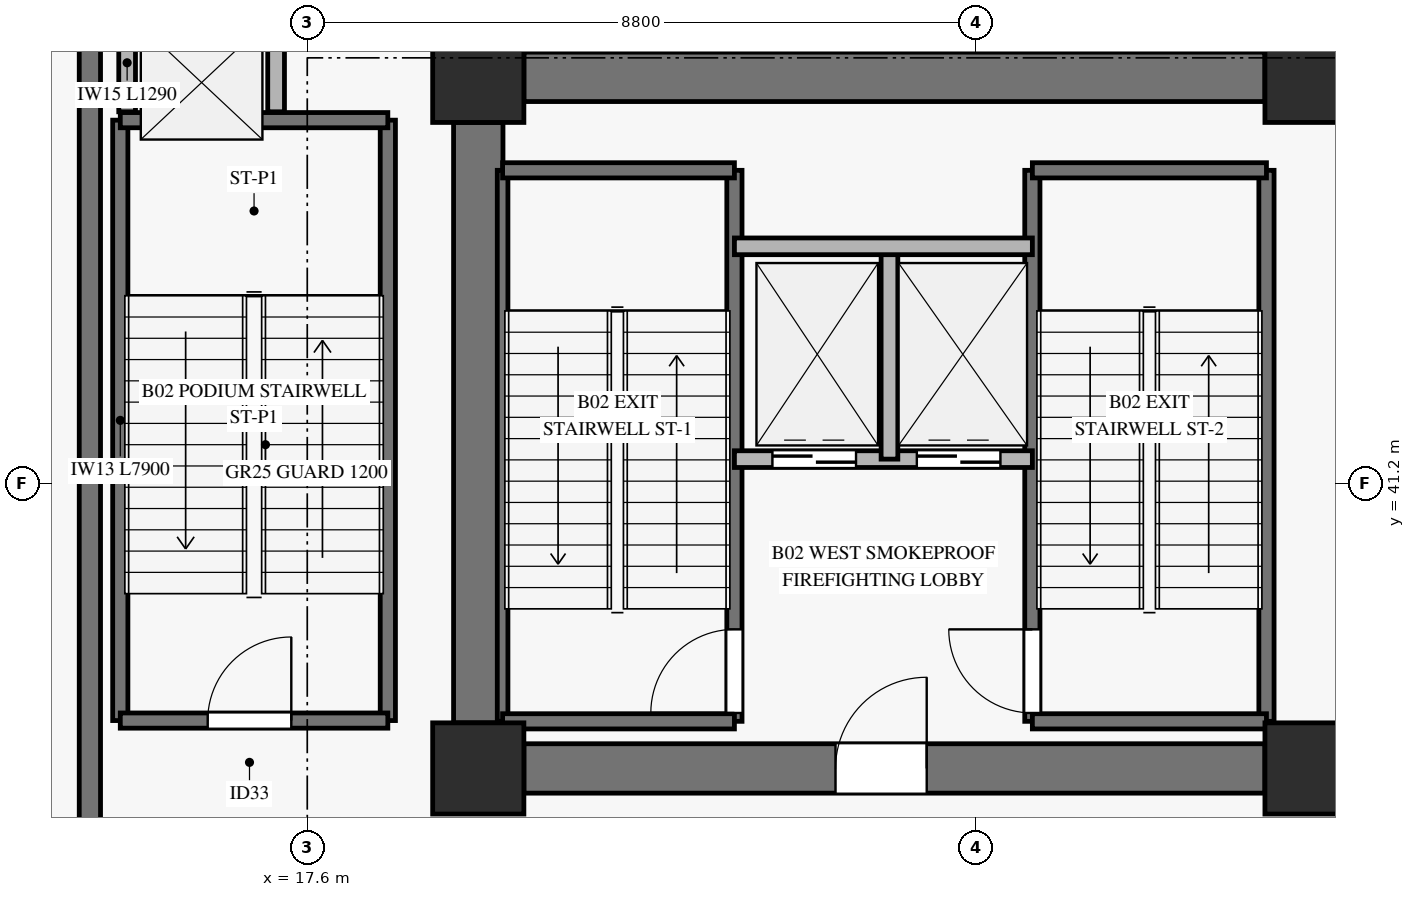
"""IFC4 building model, lengths in metres.
Left out: names, types, materials, properties, quantities, classifications, styles, units other than length and angle.
Written with IfcOpenShell. Run it as: python <this file> out.ifc"""

import sys

from ifc_helpers import new_model, si_unit, direction, frame, frame_2d, origin, origin_2d, place, context, subcontext, project, spatial, rectangle, extrude, source, transform, mapped, element, fill, save


model = new_model("IFC4")
c1 = context("Model", 3, precision=1e-05, world=origin(), true_north=direction((0.0, 1.0)))
c2 = subcontext(c1, "Body", "Model", "MODEL_VIEW")
j1 = project(units=[si_unit("LENGTHUNIT", "METRE"), si_unit("PLANEANGLEUNIT", "RADIAN")], contexts=[c1])
p1 = place(None, origin())
s1 = spatial("IfcSite", under=j1, at=p1, CompositionType="ELEMENT")
p2 = place(p1, origin())
s2 = spatial("IfcBuilding", under=s1, at=p2, CompositionType="ELEMENT")
p3 = place(p2, frame((0.0, 0.0, -10.4)))
s3 = spatial("IfcBuildingStorey", under=s2, at=p3, CompositionType="ELEMENT", Elevation=-10.4)
m1 = source(origin(), c2, "Body", "SweptSolid", [
    extrude(rectangle(XDim=1.2, YDim=1.2, at=origin_2d()), origin(), (0.0, 0.0, 1.0), 4.9),
])
for number, where, z_axis, x_axis in (
    (1, (19.85, 37.45, 0.0), (0.0, 0.0, 1.0), (1.0, 0.0, 0.0)),
    (2, (19.85, 46.55, 0.0), (0.0, 0.0, 1.0), (1.0, 0.0, 0.0)),
    (3, (30.8, 37.45, 0.0), (0.0, 0.0, 1.0), (1.0, 0.0, 0.0)),
    (4, (30.8, 46.55, 0.0), (0.0, 0.0, 1.0), (1.0, 0.0, 0.0)),
):
    element("IfcColumn", number, at=place(p3, frame(where, z_axis=z_axis, x_axis=x_axis)), inside=s3, PredefinedType="PILASTER", context=c2, shape_type="MappedRepresentation", body=[
        mapped(m1, transform((0.0, 0.0, 0.0), x_axis=(1.0, 0.0, 0.0), y_axis=(0.0, 1.0, 0.0), z_axis=(0.0, 0.0, 1.0), scale=1.0)),
    ])
p4 = place(p3, frame((20.45, 46.55, 0.0), z_axis=(0.0, 0.0, 1.0), x_axis=(1.0, 0.0, 0.0)))
e5 = element("IfcWall", 5, at=p4, inside=s3, PredefinedType="SHEAR", context=c2, shape_type="SweptSolid", body=[
    extrude(rectangle(XDim=9.75, YDim=0.65, at=frame_2d((4.875, 0.0))), origin(), (0.0, 0.0, 1.0), 4.9),
])
p5 = place(p3, frame((20.45, 37.45, 0.0), z_axis=(0.0, 0.0, 1.0), x_axis=(1.0, 0.0, 0.0)))
e6 = element("IfcWall", 6, at=p5, inside=s3, PredefinedType="SHEAR", context=c2, shape_type="SweptSolid", body=[
    extrude(rectangle(XDim=9.75, YDim=0.65, at=frame_2d((4.875, 0.0))), origin(), (0.0, 0.0, 1.0), 4.9),
])
p6 = place(p5, frame((4.1, 0.0, 0.0)))
e7 = element("IfcOpeningElement", 7, at=p6, cuts=e6, PredefinedType="OPENING", context=c2, shape_type="SweptSolid", body=[
    extrude(rectangle(XDim=1.2, YDim=2.15, at=frame_2d((0.6, 1.075))), frame((0.0, 0.335, 0.0), z_axis=(0.0, -1.0, 0.0), x_axis=(1.0, 0.0, 0.0)), (0.0, 0.0, 1.0), 0.67),
])
p7 = place(p3, frame((19.85, 38.05, 0.0), z_axis=(0.0, 0.0, 1.0), x_axis=(0.0, 1.0, 0.0)))
e8 = element("IfcWall", 8, at=p7, inside=s3, PredefinedType="SHEAR", context=c2, shape_type="SweptSolid", body=[
    extrude(rectangle(XDim=7.9, YDim=0.65, at=frame_2d((3.95, 0.0))), origin(), (0.0, 0.0, 1.0), 4.9),
])
p8 = place(p3, frame((14.74, 6.76, 0.0), z_axis=(0.0, 0.0, 1.0), x_axis=(0.0, 1.0, 0.0)))
e9 = element("IfcWall", 9, at=p8, inside=s3, PredefinedType="SOLIDWALL", context=c2, shape_type="SweptSolid", body=[
    extrude(rectangle(XDim=42.0, YDim=0.28, at=frame_2d((21.0, 0.0))), origin(), (0.0, 0.0, 1.0), 5.2),
])
p9 = place(p3, frame((20.17, 38.07, 0.0), z_axis=(0.0, 0.0, 1.0), x_axis=(0.0, 1.0, 0.0)))
e10 = element("IfcWall", 10, at=p9, inside=s3, PredefinedType="SOLIDWALL", context=c2, shape_type="SweptSolid", body=[
    extrude(rectangle(XDim=7.25, YDim=0.14, at=frame_2d((3.625, 0.0))), origin(), (0.0, 0.0, 1.0), 5.2),
])
p10 = place(p3, frame((23.22, 38.07, 0.0), z_axis=(0.0, 0.0, 1.0), x_axis=(0.0, 1.0, 0.0)))
e11 = element("IfcWall", 11, at=p10, inside=s3, PredefinedType="SOLIDWALL", context=c2, shape_type="SweptSolid", body=[
    extrude(rectangle(XDim=7.25, YDim=0.2, at=frame_2d((3.625, 0.0))), origin(), (0.0, 0.0, 1.0), 5.2),
])
p11 = place(p10, frame((0.11, 0.0, 0.0)))
e12 = element("IfcOpeningElement", 12, at=p11, cuts=e11, PredefinedType="OPENING", context=c2, shape_type="SweptSolid", body=[
    extrude(rectangle(XDim=1.1, YDim=2.15, at=frame_2d((0.55, 1.075))), frame((0.0, 0.11, 0.0), z_axis=(0.0, -1.0, 0.0), x_axis=(1.0, 0.0, 0.0)), (0.0, 0.0, 1.0), 0.22),
])
for number, where, z_axis, x_axis in (
    (13, (20.17, 45.32, 0.0), (0.0, 0.0, 1.0), (1.0, 0.0, 0.0)),
    (14, (20.17, 38.07, 0.0), (0.0, 0.0, 1.0), (1.0, 0.0, 0.0)),
):
    element("IfcWall", number, at=place(p3, frame(where, z_axis=z_axis, x_axis=x_axis)), inside=s3, PredefinedType="SOLIDWALL", context=c2, shape_type="SweptSolid", body=[
        extrude(rectangle(XDim=3.05, YDim=0.2, at=frame_2d((1.525, 0.0))), origin(), (0.0, 0.0, 1.0), 5.2),
    ])
p12 = place(p3, frame((27.14, 38.07, 0.0), z_axis=(0.0, 0.0, 1.0), x_axis=(0.0, 1.0, 0.0)))
e15 = element("IfcWall", 15, at=p12, inside=s3, PredefinedType="SOLIDWALL", context=c2, shape_type="SweptSolid", body=[
    extrude(rectangle(XDim=7.25, YDim=0.2, at=frame_2d((3.625, 0.0))), origin(), (0.0, 0.0, 1.0), 5.2),
])
p13 = place(p12, frame((0.11, 0.0, 0.0)))
e16 = element("IfcOpeningElement", 16, at=p13, cuts=e15, PredefinedType="OPENING", context=c2, shape_type="SweptSolid", body=[
    extrude(rectangle(XDim=1.1, YDim=2.15, at=frame_2d((0.55, 1.075))), frame((0.0, 0.11, 0.0), z_axis=(0.0, -1.0, 0.0), x_axis=(1.0, 0.0, 0.0)), (0.0, 0.0, 1.0), 0.22),
])
p14 = place(p3, frame((30.22, 38.07, 0.0), z_axis=(0.0, 0.0, 1.0), x_axis=(0.0, 1.0, 0.0)))
e17 = element("IfcWall", 17, at=p14, inside=s3, PredefinedType="SOLIDWALL", context=c2, shape_type="SweptSolid", body=[
    extrude(rectangle(XDim=7.25, YDim=0.2, at=frame_2d((3.625, 0.0))), origin(), (0.0, 0.0, 1.0), 5.2),
])
for number, where, z_axis, x_axis in (
    (18, (27.14, 45.32, 0.0), (0.0, 0.0, 1.0), (1.0, 0.0, 0.0)),
    (19, (27.14, 38.07, 0.0), (0.0, 0.0, 1.0), (1.0, 0.0, 0.0)),
):
    element("IfcWall", number, at=place(p3, frame(where, z_axis=z_axis, x_axis=x_axis)), inside=s3, PredefinedType="SOLIDWALL", context=c2, shape_type="SweptSolid", body=[
        extrude(rectangle(XDim=3.08, YDim=0.2, at=frame_2d((1.54, 0.0))), origin(), (0.0, 0.0, 1.0), 5.2),
    ])
p15 = place(p3, frame((23.22, 41.52, 0.0), z_axis=(0.0, 0.0, 1.0), x_axis=(1.0, 0.0, 0.0)))
e20 = element("IfcWall", 20, at=p15, inside=s3, PredefinedType="SOLIDWALL", context=c2, shape_type="SweptSolid", body=[
    extrude(rectangle(XDim=3.92, YDim=0.22, at=frame_2d((1.96, 0.0))), origin(), (0.0, 0.0, 1.0), 4.9),
])
p16 = place(p15, frame((0.5, 0.0, 0.0)))
e21 = element("IfcOpeningElement", 21, at=p16, cuts=e20, PredefinedType="OPENING", context=c2, shape_type="SweptSolid", body=[
    extrude(rectangle(XDim=1.1, YDim=2.2, at=frame_2d((0.55, 1.1))), frame((0.0, 0.12, 0.0), z_axis=(0.0, -1.0, 0.0), x_axis=(1.0, 0.0, 0.0)), (0.0, 0.0, 1.0), 0.24),
])
p17 = place(p15, frame((2.4, 0.0, 0.0)))
e22 = element("IfcOpeningElement", 22, at=p17, cuts=e20, PredefinedType="OPENING", context=c2, shape_type="SweptSolid", body=[
    extrude(rectangle(XDim=1.1, YDim=2.2, at=frame_2d((0.55, 1.1))), frame((0.0, 0.12, 0.0), z_axis=(0.0, -1.0, 0.0), x_axis=(1.0, 0.0, 0.0)), (0.0, 0.0, 1.0), 0.24),
])
p18 = place(p3, frame((25.26, 41.52, 0.0), z_axis=(0.0, 0.0, 1.0), x_axis=(0.0, 1.0, 0.0)))
e23 = element("IfcWall", 23, at=p18, inside=s3, PredefinedType="SOLIDWALL", context=c2, shape_type="SweptSolid", body=[
    extrude(rectangle(XDim=2.8, YDim=0.22, at=frame_2d((1.4, 0.0))), origin(), (0.0, 0.0, 1.0), 4.9),
])
p19 = place(p3, frame((23.22, 44.32, 0.0), z_axis=(0.0, 0.0, 1.0), x_axis=(1.0, 0.0, 0.0)))
e24 = element("IfcWall", 24, at=p19, inside=s3, PredefinedType="SOLIDWALL", context=c2, shape_type="SweptSolid", body=[
    extrude(rectangle(XDim=3.92, YDim=0.22, at=frame_2d((1.96, 0.0))), origin(), (0.0, 0.0, 1.0), 4.9),
])
for number, where, z_axis, x_axis in (
    (25, (15.14, 38.08, 0.0), (0.0, 0.0, 1.0), (0.0, 1.0, 0.0)),
    (26, (18.66, 38.08, 0.0), (0.0, 0.0, 1.0), (0.0, 1.0, 0.0)),
):
    element("IfcWall", number, at=place(p3, frame(where, z_axis=z_axis, x_axis=x_axis)), inside=s3, PredefinedType="SOLIDWALL", context=c2, shape_type="SweptSolid", body=[
        extrude(rectangle(XDim=7.9, YDim=0.2, at=frame_2d((3.95, 0.0))), origin(), (0.0, 0.0, 1.0), 5.2),
    ])
p20 = place(p3, frame((15.14, 45.98, 0.0), z_axis=(0.0, 0.0, 1.0), x_axis=(1.0, 0.0, 0.0)))
e27 = element("IfcWall", 27, at=p20, inside=s3, PredefinedType="SOLIDWALL", context=c2, shape_type="SweptSolid", body=[
    extrude(rectangle(XDim=3.52, YDim=0.2, at=frame_2d((1.76, 0.0))), origin(), (0.0, 0.0, 1.0), 5.2),
])
p21 = place(p3, frame((15.14, 38.08, 0.0), z_axis=(0.0, 0.0, 1.0), x_axis=(1.0, 0.0, 0.0)))
e28 = element("IfcWall", 28, at=p21, inside=s3, PredefinedType="SOLIDWALL", context=c2, shape_type="SweptSolid", body=[
    extrude(rectangle(XDim=3.52, YDim=0.2, at=frame_2d((1.76, 0.0))), origin(), (0.0, 0.0, 1.0), 5.2),
])
p22 = place(p21, frame((1.15, 0.0, 0.0)))
e29 = element("IfcOpeningElement", 29, at=p22, cuts=e28, PredefinedType="OPENING", context=c2, shape_type="SweptSolid", body=[
    extrude(rectangle(XDim=1.1, YDim=2.15, at=frame_2d((0.55, 1.075))), frame((0.0, 0.11, 0.0), z_axis=(0.0, -1.0, 0.0), x_axis=(1.0, 0.0, 0.0)), (0.0, 0.0, 1.0), 0.22),
])
for number, where, z_axis, x_axis in (
    (30, (15.23, 46.09, 0.0), (0.0, 0.0, 1.0), (0.0, 1.0, 0.0)),
    (31, (17.19, 46.09, 0.0), (0.0, 0.0, 1.0), (0.0, 1.0, 0.0)),
):
    element("IfcWall", number, at=place(p3, frame(where, z_axis=z_axis, x_axis=x_axis)), inside=s3, PredefinedType="SOLIDWALL", context=c2, shape_type="SweptSolid", body=[
        extrude(rectangle(XDim=1.29, YDim=0.22, at=frame_2d((0.645, 0.0))), origin(), (0.0, 0.0, 1.0), 4.9),
    ])
m2 = source(origin(), c2, "Body", "SweptSolid", [
    extrude(rectangle(XDim=1.1, YDim=2.15, at=frame_2d((0.55, 1.075))), frame((0.0, 0.025, 0.0), z_axis=(0.0, -1.0, 0.0), x_axis=(1.0, 0.0, 0.0)), (0.0, 0.0, 1.0), 0.05),
])
p23 = place(p11, origin())
e32 = element("IfcDoor", 32, at=p23, inside=s3, OperationType="SINGLE_SWING_LEFT", PredefinedType="DOOR", context=c2, shape_type="MappedRepresentation", body=[
    mapped(m2, transform((0.0, 0.0, 0.0), x_axis=(1.0, 0.0, 0.0), y_axis=(0.0, 1.0, 0.0), z_axis=(0.0, 0.0, 1.0), scale=1.0)),
])
fill(e12, e32)
p24 = place(p13, origin())
e33 = element("IfcDoor", 33, at=p24, inside=s3, OperationType="SINGLE_SWING_RIGHT", PredefinedType="DOOR", context=c2, shape_type="MappedRepresentation", body=[
    mapped(m2, transform((0.0, 0.0, 0.0), x_axis=(1.0, 0.0, 0.0), y_axis=(0.0, 1.0, 0.0), z_axis=(0.0, 0.0, 1.0), scale=1.0)),
])
fill(e16, e33)
m3 = source(origin(), c2, "Body", "SweptSolid", [
    extrude(rectangle(XDim=1.1, YDim=2.2, at=frame_2d((0.55, 1.1))), frame((0.0, 0.025, 0.0), z_axis=(0.0, -1.0, 0.0), x_axis=(1.0, 0.0, 0.0)), (0.0, 0.0, 1.0), 0.05),
])
p25 = place(p16, origin())
e34 = element("IfcDoor", 34, at=p25, inside=s3, OperationType="SLIDING_TO_LEFT", PredefinedType="DOOR", context=c2, shape_type="MappedRepresentation", body=[
    mapped(m3, transform((0.0, 0.0, 0.0), x_axis=(1.0, 0.0, 0.0), y_axis=(0.0, 1.0, 0.0), z_axis=(0.0, 0.0, 1.0), scale=1.0)),
])
fill(e21, e34)
p26 = place(p17, origin())
e35 = element("IfcDoor", 35, at=p26, inside=s3, OperationType="SLIDING_TO_LEFT", PredefinedType="DOOR", context=c2, shape_type="MappedRepresentation", body=[
    mapped(m3, transform((0.0, 0.0, 0.0), x_axis=(1.0, 0.0, 0.0), y_axis=(0.0, 1.0, 0.0), z_axis=(0.0, 0.0, 1.0), scale=1.0)),
])
fill(e22, e35)
m4 = source(origin(), c2, "Body", "SweptSolid", [
    extrude(rectangle(XDim=1.2, YDim=2.15, at=frame_2d((0.6, 1.075))), frame((0.0, 0.025, 0.0), z_axis=(0.0, -1.0, 0.0), x_axis=(1.0, 0.0, 0.0)), (0.0, 0.0, 1.0), 0.05),
])
p27 = place(p6, origin())
e36 = element("IfcDoor", 36, at=p27, inside=s3, OperationType="SINGLE_SWING_RIGHT", PredefinedType="DOOR", context=c2, shape_type="MappedRepresentation", body=[
    mapped(m4, transform((0.0, 0.0, 0.0), x_axis=(1.0, 0.0, 0.0), y_axis=(0.0, 1.0, 0.0), z_axis=(0.0, 0.0, 1.0), scale=1.0)),
])
fill(e7, e36)
p28 = place(p22, origin())
e37 = element("IfcDoor", 37, at=p28, inside=s3, OperationType="SINGLE_SWING_RIGHT", PredefinedType="DOOR", context=c2, shape_type="MappedRepresentation", body=[
    mapped(m2, transform((0.0, 0.0, 0.0), x_axis=(1.0, 0.0, 0.0), y_axis=(0.0, 1.0, 0.0), z_axis=(0.0, 0.0, 1.0), scale=1.0)),
])
fill(e29, e37)
save(model, sys.argv[1])
